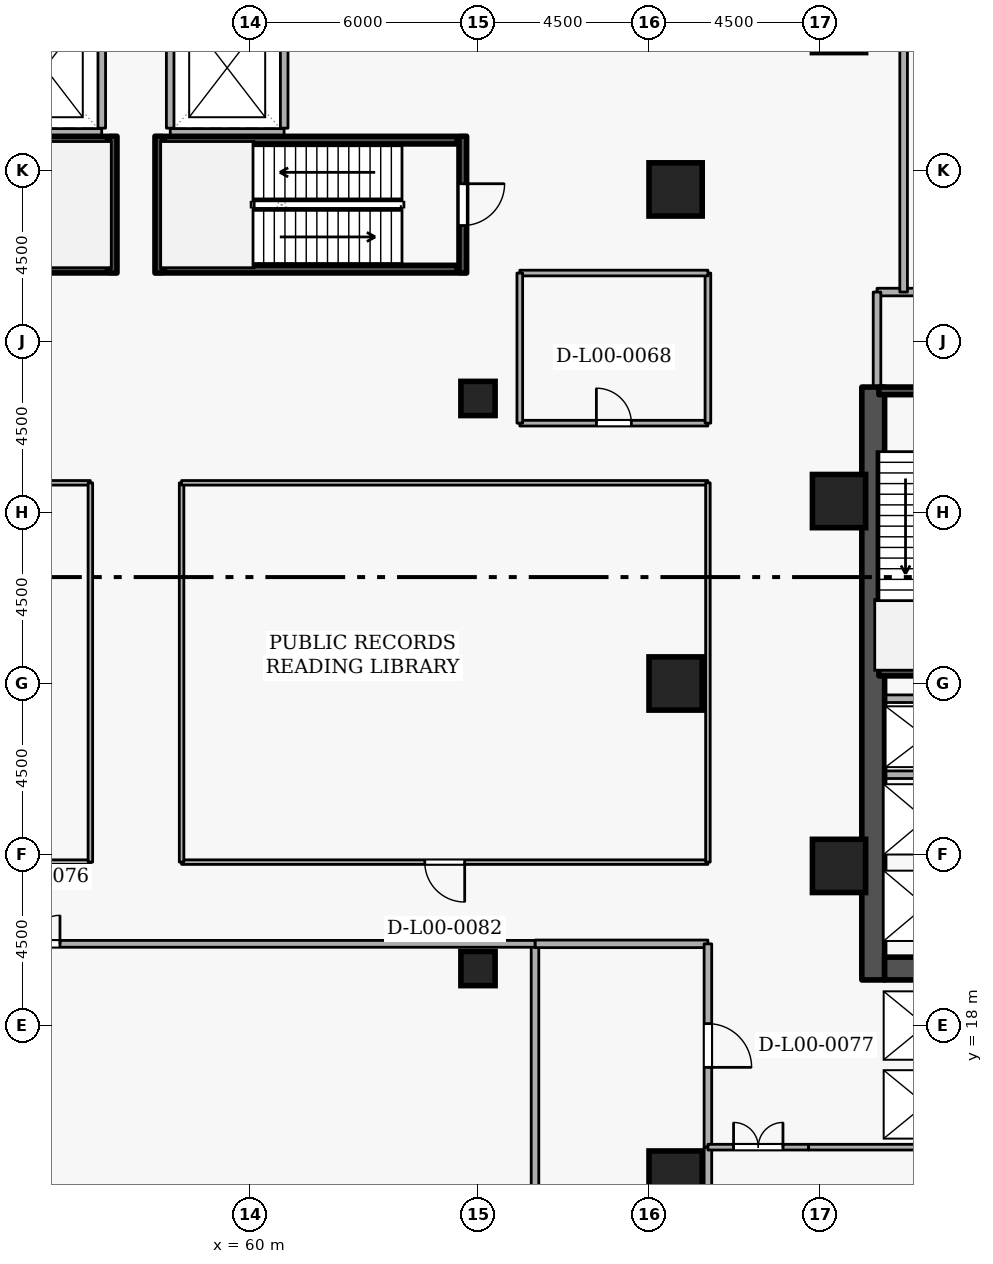
"""IFC4 building model, lengths in metres.
Left out: names, types, materials, properties, quantities, classifications, styles, units other than length and angle.
Written with IfcOpenShell. Run it as: python <this file> out.ifc"""

import sys

from ifc_helpers import new_model, si_unit, direction, frame, frame_2d, origin, origin_2d, place, context, subcontext, project, spatial, rectangle, extrude, element, fill, save


model = new_model("IFC4")
c1 = context("Model", 3, precision=1e-05, world=origin(), true_north=direction((0.0, 1.0)))
c2 = subcontext(c1, "Body", "Model", "MODEL_VIEW")
j1 = project(units=[si_unit("LENGTHUNIT", "METRE"), si_unit("PLANEANGLEUNIT", "RADIAN")], contexts=[c1])
p1 = place(None, origin())
s1 = spatial("IfcSite", under=j1, at=p1, CompositionType="ELEMENT")
p2 = place(p1, origin())
s2 = spatial("IfcBuilding", under=s1, at=p2, CompositionType="ELEMENT")
p3 = place(p2, origin())
s3 = spatial("IfcBuildingStorey", under=s2, at=p3, CompositionType="ELEMENT", Elevation=0.0)
p4 = place(p3, frame((76.4, 19.2, 0.0), z_axis=(0.0, 0.0, 1.0), x_axis=(0.0, 1.0, 0.0)))
e1 = element("IfcWall", 1, at=p4, inside=s3, PredefinedType="SHEAR", context=c2, shape_type="SweptSolid", body=[
    extrude(rectangle(XDim=15.6, YDim=0.6, at=frame_2d((7.8, 0.0))), origin(), (0.0, 0.0, 1.0), 4.8),
])
p5 = place(p3, frame((76.7, 19.5, 0.0), z_axis=(0.0, 0.0, 1.0), x_axis=(1.0, 0.0, 0.0)))
e2 = element("IfcWall", 2, at=p5, inside=s3, PredefinedType="SHEAR", context=c2, shape_type="SweptSolid", body=[
    extrude(rectangle(XDim=5.7, YDim=0.6, at=frame_2d((2.85, 0.0))), origin(), (0.0, 0.0, 1.0), 4.8),
])
for number, where, z_axis, x_axis in (
    (3, (71.2, 14.0, 0.0), (0.0, 0.0, 1.0), (1.0, 0.0, 0.0)),
    (4, (71.2, 27.0, 0.0), (0.0, 0.0, 1.0), (1.0, 0.0, 0.0)),
    (5, (71.2, 40.0, 0.0), (0.0, 0.0, 1.0), (1.0, 0.0, 0.0)),
    (6, (75.5, 22.2, 0.0), (0.0, 0.0, 1.0), (1.0, 0.0, 0.0)),
    (7, (75.5, 31.8, 0.0), (0.0, 0.0, 1.0), (1.0, 0.0, 0.0)),
):
    element("IfcColumn", number, at=place(p3, frame(where, z_axis=z_axis, x_axis=x_axis)), inside=s3, PredefinedType="COLUMN", context=c2, shape_type="SweptSolid", body=[
        extrude(rectangle(XDim=1.4, YDim=1.4, at=origin_2d()), origin(), (0.0, 0.0, 1.0), 4.8),
    ])
for number, where, z_axis, x_axis in (
    (8, (66.0, 19.5, 0.0), (0.0, 0.0, 1.0), (1.0, 0.0, 0.0)),
    (9, (66.0, 34.5, 0.0), (0.0, 0.0, 1.0), (1.0, 0.0, 0.0)),
):
    element("IfcColumn", number, at=place(p3, frame(where, z_axis=z_axis, x_axis=x_axis)), inside=s3, PredefinedType="COLUMN", context=c2, shape_type="SweptSolid", body=[
        extrude(rectangle(XDim=0.9, YDim=0.9, at=origin_2d()), origin(), (0.0, 0.0, 1.0), 4.8),
    ])
for number, where, z_axis, x_axis in (
    (10, (76.712, 26.6, 0.0), (0.0, 0.0, 1.0), (1.0, 0.0, 0.0)),
    (11, (76.712, 24.6, 0.0), (0.0, 0.0, 1.0), (1.0, 0.0, 0.0)),
):
    element("IfcWall", number, at=place(p3, frame(where, z_axis=z_axis, x_axis=x_axis)), inside=s3, PredefinedType="STANDARD", context=c2, shape_type="SweptSolid", body=[
        extrude(rectangle(XDim=2.436, YDim=0.2, at=frame_2d((1.218, 0.0))), origin(), (0.0, 0.0, 1.0), 4.46),
    ])
p6 = place(p3, frame((53.102, 41.5, 0.0), z_axis=(0.0, 0.0, 1.0), x_axis=(1.0, 0.0, 0.0)))
e12 = element("IfcWall", 12, at=p6, inside=s3, PredefinedType="STANDARD", context=c2, shape_type="SweptSolid", body=[
    extrude(rectangle(XDim=2.996, YDim=0.2, at=frame_2d((1.498, 0.0))), origin(), (0.0, 0.0, 1.0), 4.46),
])
p7 = place(p3, frame((56.1, 41.612, 0.0), z_axis=(0.0, 0.0, 1.0), x_axis=(0.0, 1.0, 0.0)))
e13 = element("IfcWall", 13, at=p7, inside=s3, PredefinedType="STANDARD", context=c2, shape_type="SweptSolid", body=[
    extrude(rectangle(XDim=3.286, YDim=0.2, at=frame_2d((1.643, 0.0))), origin(), (0.0, 0.0, 1.0), 4.46),
])
p8 = place(p3, frame((57.902, 41.5, 0.0), z_axis=(0.0, 0.0, 1.0), x_axis=(1.0, 0.0, 0.0)))
e14 = element("IfcWall", 14, at=p8, inside=s3, PredefinedType="STANDARD", context=c2, shape_type="SweptSolid", body=[
    extrude(rectangle(XDim=2.996, YDim=0.2, at=frame_2d((1.498, 0.0))), origin(), (0.0, 0.0, 1.0), 4.46),
])
for number, where, z_axis, x_axis in (
    (15, (60.9, 41.612, 0.0), (0.0, 0.0, 1.0), (0.0, 1.0, 0.0)),
    (16, (57.9, 41.612, 0.0), (0.0, 0.0, 1.0), (0.0, 1.0, 0.0)),
):
    element("IfcWall", number, at=place(p3, frame(where, z_axis=z_axis, x_axis=x_axis)), inside=s3, PredefinedType="STANDARD", context=c2, shape_type="SweptSolid", body=[
        extrude(rectangle(XDim=3.286, YDim=0.2, at=frame_2d((1.643, 0.0))), origin(), (0.0, 0.0, 1.0), 4.46),
    ])
p9 = place(p3, frame((76.55, 34.7, 0.0), z_axis=(0.0, 0.0, 1.0), x_axis=(1.0, 0.0, 0.0)))
e17 = element("IfcWall", 17, at=p9, inside=s3, PredefinedType="SHEAR", context=c2, shape_type="SweptSolid", body=[
    extrude(rectangle(XDim=3.35, YDim=0.2, at=frame_2d((1.675, 0.0))), origin(), (0.0, 0.0, 1.0), 4.8),
])
p10 = place(p9, frame((1.125, 0.0, 0.0)))
e18 = element("IfcOpeningElement", 18, at=p10, cuts=e17, PredefinedType="OPENING", context=c2, shape_type="SweptSolid", body=[
    extrude(rectangle(XDim=1.1, YDim=2.1, at=frame_2d((0.55, 1.05))), frame((0.0, 0.11, 0.0), z_axis=(0.0, -1.0, 0.0), x_axis=(1.0, 0.0, 0.0)), (0.0, 0.0, 1.0), 0.22),
])
p11 = place(p3, frame((79.9, 27.3, 0.0), z_axis=(0.0, 0.0, 1.0), x_axis=(-1.0, 0.0, 0.0)))
e19 = element("IfcWall", 19, at=p11, inside=s3, PredefinedType="SHEAR", context=c2, shape_type="SweptSolid", body=[
    extrude(rectangle(XDim=3.35, YDim=0.2, at=frame_2d((1.675, 0.0))), origin(), (0.0, 0.0, 1.0), 4.8),
])
p12 = place(p3, frame((56.4, 41.4, 0.0), z_axis=(0.0, 0.0, 1.0), x_axis=(0.0, -1.0, 0.0)))
e20 = element("IfcWall", 20, at=p12, inside=s3, PredefinedType="SHEAR", context=c2, shape_type="SweptSolid", body=[
    extrude(rectangle(XDim=3.6, YDim=0.2, at=frame_2d((1.8, 0.0))), origin(), (0.0, 0.0, 1.0), 4.8),
])
for number, where, z_axis, x_axis in (
    (21, (56.25, 41.297, 0.0), (0.0, 0.0, 1.0), (-1.0, 0.0, 0.0)),
    (22, (48.55, 37.903, 0.0), (0.0, 0.0, 1.0), (1.0, 0.0, 0.0)),
):
    element("IfcWall", number, at=place(p3, frame(where, z_axis=z_axis, x_axis=x_axis)), inside=s3, PredefinedType="SHEAR", context=c2, shape_type="SweptSolid", body=[
        extrude(rectangle(XDim=7.7, YDim=0.2, at=frame_2d((3.85, 0.0))), origin(), (0.0, 0.0, 1.0), 4.8),
    ])
p13 = place(p3, frame((65.6, 41.4, 0.0), z_axis=(0.0, 0.0, 1.0), x_axis=(0.0, -1.0, 0.0)))
e23 = element("IfcWall", 23, at=p13, inside=s3, PredefinedType="SHEAR", context=c2, shape_type="SweptSolid", body=[
    extrude(rectangle(XDim=3.6, YDim=0.2, at=frame_2d((1.8, 0.0))), origin(), (0.0, 0.0, 1.0), 4.8),
])
p14 = place(p13, frame((1.25, 0.0, 0.0)))
e24 = element("IfcOpeningElement", 24, at=p14, cuts=e23, PredefinedType="OPENING", context=c2, shape_type="SweptSolid", body=[
    extrude(rectangle(XDim=1.1, YDim=2.1, at=frame_2d((0.55, 1.05))), frame((0.0, 0.11, 0.0), z_axis=(0.0, -1.0, 0.0), x_axis=(1.0, 0.0, 0.0)), (0.0, 0.0, 1.0), 0.22),
])
p15 = place(p3, frame((57.6, 37.8, 0.0), z_axis=(0.0, 0.0, 1.0), x_axis=(0.0, 1.0, 0.0)))
e25 = element("IfcWall", 25, at=p15, inside=s3, PredefinedType="SHEAR", context=c2, shape_type="SweptSolid", body=[
    extrude(rectangle(XDim=3.6, YDim=0.2, at=frame_2d((1.8, 0.0))), origin(), (0.0, 0.0, 1.0), 4.8),
])
for number, where, z_axis, x_axis in (
    (26, (57.75, 37.903, 0.0), (0.0, 0.0, 1.0), (1.0, 0.0, 0.0)),
    (27, (65.45, 41.297, 0.0), (0.0, 0.0, 1.0), (-1.0, 0.0, 0.0)),
):
    element("IfcWall", number, at=place(p3, frame(where, z_axis=z_axis, x_axis=x_axis)), inside=s3, PredefinedType="SHEAR", context=c2, shape_type="SweptSolid", body=[
        extrude(rectangle(XDim=7.7, YDim=0.2, at=frame_2d((3.85, 0.0))), origin(), (0.0, 0.0, 1.0), 4.8),
    ])
p16 = place(p3, frame((81.65, 37.3, 0.0), z_axis=(0.0, 0.0, 1.0), x_axis=(-1.0, 0.0, 0.0)))
e28 = element("IfcWall", 28, at=p16, inside=s3, PredefinedType="STANDARD", context=c2, shape_type="SweptSolid", body=[
    extrude(rectangle(XDim=5.15, YDim=0.2, at=frame_2d((2.575, 0.0))), origin(), (0.0, 0.0, 1.0), 4.46),
])
p17 = place(p16, frame((2.75, 0.0, 0.0)))
e29 = element("IfcOpeningElement", 29, at=p17, cuts=e28, PredefinedType="OPENING", context=c2, shape_type="SweptSolid", body=[
    extrude(rectangle(XDim=1.15, YDim=2.1, at=frame_2d((0.575, 1.05))), frame((0.0, 0.11, 0.0), z_axis=(0.0, -1.0, 0.0), x_axis=(1.0, 0.0, 0.0)), (0.0, 0.0, 1.0), 0.22),
])
p18 = place(p3, frame((76.5, 37.3, 0.0), z_axis=(0.0, 0.0, 1.0), x_axis=(0.0, -1.0, 0.0)))
e30 = element("IfcWall", 30, at=p18, inside=s3, PredefinedType="STANDARD", context=c2, shape_type="SweptSolid", body=[
    extrude(rectangle(XDim=2.5, YDim=0.2, at=frame_2d((1.25, 0.0))), origin(), (0.0, 0.0, 1.0), 4.46),
])
p19 = place(p3, frame((77.2, 37.3, 0.0), z_axis=(0.0, 0.0, 1.0), x_axis=(0.0, 1.0, 0.0)))
e31 = element("IfcWall", 31, at=p19, inside=s3, PredefinedType="STANDARD", context=c2, shape_type="SweptSolid", body=[
    extrude(rectangle(XDim=11.88, YDim=0.2, at=frame_2d((5.94, 0.0))), origin(), (0.0, 0.0, 1.0), 4.46),
])
p20 = place(p3, frame((67.5, 4.82, 0.0), z_axis=(0.0, 0.0, 1.0), x_axis=(0.0, 1.0, 0.0)))
e32 = element("IfcWall", 32, at=p20, inside=s3, PredefinedType="STANDARD", context=c2, shape_type="SweptSolid", body=[
    extrude(rectangle(XDim=15.33, YDim=0.2, at=frame_2d((7.665, 0.0))), origin(), (0.0, 0.0, 1.0), 3.538),
])
p21 = place(p3, frame((67.5, 20.15, 0.0), z_axis=(0.0, 0.0, 1.0), x_axis=(1.0, 0.0, 0.0)))
e33 = element("IfcWall", 33, at=p21, inside=s3, PredefinedType="STANDARD", context=c2, shape_type="SweptSolid", body=[
    extrude(rectangle(XDim=4.55, YDim=0.2, at=frame_2d((2.275, 0.0))), origin(), (0.0, 0.0, 1.0), 4.46),
])
p22 = place(p3, frame((72.05, 20.15, 0.0), z_axis=(0.0, 0.0, 1.0), x_axis=(0.0, -1.0, 0.0)))
e34 = element("IfcWall", 34, at=p22, inside=s3, PredefinedType="STANDARD", context=c2, shape_type="SweptSolid", body=[
    extrude(rectangle(XDim=5.35, YDim=0.2, at=frame_2d((2.675, 0.0))), origin(), (0.0, 0.0, 1.0), 4.46),
])
p23 = place(p22, frame((2.1, 0.0, 0.0)))
e35 = element("IfcOpeningElement", 35, at=p23, cuts=e34, PredefinedType="OPENING", context=c2, shape_type="SweptSolid", body=[
    extrude(rectangle(XDim=1.15, YDim=2.1, at=frame_2d((0.575, 1.05))), frame((0.0, 0.11, 0.0), z_axis=(0.0, -1.0, 0.0), x_axis=(1.0, 0.0, 0.0)), (0.0, 0.0, 1.0), 0.22),
])
p24 = place(p3, frame((72.05, 14.8, 0.0), z_axis=(0.0, 0.0, 1.0), x_axis=(0.0, -1.0, 0.0)))
e36 = element("IfcWall", 36, at=p24, inside=s3, PredefinedType="STANDARD", context=c2, shape_type="SweptSolid", body=[
    extrude(rectangle(XDim=9.98, YDim=0.2, at=frame_2d((4.99, 0.0))), origin(), (0.0, 0.0, 1.0), 4.46),
])
p25 = place(p3, frame((67.1, 33.85, 0.0), z_axis=(0.0, 0.0, 1.0), x_axis=(1.0, 0.0, 0.0)))
e37 = element("IfcWall", 37, at=p25, inside=s3, PredefinedType="PARTITIONING", context=c2, shape_type="SweptSolid", body=[
    extrude(rectangle(XDim=4.95, YDim=0.15, at=frame_2d((2.475, 0.0))), origin(), (0.0, 0.0, 1.0), 4.46),
])
p26 = place(p25, frame((2.015, 0.0, 0.0)))
e38 = element("IfcOpeningElement", 38, at=p26, cuts=e37, PredefinedType="OPENING", context=c2, shape_type="SweptSolid", body=[
    extrude(rectangle(XDim=0.92, YDim=2.08, at=frame_2d((0.46, 1.04))), frame((0.0, 0.085, 0.0), z_axis=(0.0, -1.0, 0.0), x_axis=(1.0, 0.0, 0.0)), (0.0, 0.0, 1.0), 0.17),
])
p27 = place(p3, frame((72.05, 33.85, 0.0), z_axis=(0.0, 0.0, 1.0), x_axis=(0.0, 1.0, 0.0)))
e39 = element("IfcWall", 39, at=p27, inside=s3, PredefinedType="PARTITIONING", context=c2, shape_type="SweptSolid", body=[
    extrude(rectangle(XDim=3.95, YDim=0.15, at=frame_2d((1.975, 0.0))), origin(), (0.0, 0.0, 1.0), 4.46),
])
p28 = place(p3, frame((72.05, 37.8, 0.0), z_axis=(0.0, 0.0, 1.0), x_axis=(-1.0, 0.0, 0.0)))
e40 = element("IfcWall", 40, at=p28, inside=s3, PredefinedType="PARTITIONING", context=c2, shape_type="SweptSolid", body=[
    extrude(rectangle(XDim=4.95, YDim=0.15, at=frame_2d((2.475, 0.0))), origin(), (0.0, 0.0, 1.0), 4.46),
])
p29 = place(p3, frame((67.1, 37.8, 0.0), z_axis=(0.0, 0.0, 1.0), x_axis=(0.0, -1.0, 0.0)))
e41 = element("IfcWall", 41, at=p29, inside=s3, PredefinedType="PARTITIONING", context=c2, shape_type="SweptSolid", body=[
    extrude(rectangle(XDim=3.95, YDim=0.15, at=frame_2d((1.975, 0.0))), origin(), (0.0, 0.0, 1.0), 4.46),
])
p30 = place(p3, frame((41.0, 20.15, 0.0), z_axis=(0.0, 0.0, 1.0), x_axis=(1.0, 0.0, 0.0)))
e42 = element("IfcWall", 42, at=p30, inside=s3, PredefinedType="PARTITIONING", context=c2, shape_type="SweptSolid", body=[
    extrude(rectangle(XDim=26.5, YDim=0.18, at=frame_2d((13.25, 0.0))), origin(), (0.0, 0.0, 1.0), 4.46),
])
p31 = place(p30, frame((12.5, 0.0, 0.0)))
e43 = element("IfcOpeningElement", 43, at=p31, cuts=e42, PredefinedType="OPENING", context=c2, shape_type="SweptSolid", body=[
    extrude(rectangle(XDim=1.5, YDim=2.15, at=frame_2d((0.75, 1.075))), frame((0.0, 0.1, 0.0), z_axis=(0.0, -1.0, 0.0), x_axis=(1.0, 0.0, 0.0)), (0.0, 0.0, 1.0), 0.2),
])
p32 = place(p3, frame((72.05, 14.8, 0.0), z_axis=(0.0, 0.0, 1.0), x_axis=(1.0, 0.0, 0.0)))
e44 = element("IfcWall", 44, at=p32, inside=s3, PredefinedType="PARTITIONING", context=c2, shape_type="SweptSolid", body=[
    extrude(rectangle(XDim=2.65, YDim=0.15, at=frame_2d((1.325, 0.0))), origin(), (0.0, 0.0, 1.0), 4.46),
])
p33 = place(p32, frame((0.675, 0.0, 0.0)))
e45 = element("IfcOpeningElement", 45, at=p33, cuts=e44, PredefinedType="OPENING", context=c2, shape_type="SweptSolid", body=[
    extrude(rectangle(XDim=1.3, YDim=2.12, at=frame_2d((0.65, 1.06))), frame((0.0, 0.085, 0.0), z_axis=(0.0, -1.0, 0.0), x_axis=(1.0, 0.0, 0.0)), (0.0, 0.0, 1.0), 0.17),
])
p34 = place(p3, frame((74.7, 14.8, 0.0), z_axis=(0.0, 0.0, 1.0), x_axis=(1.0, 0.0, 0.0)))
e46 = element("IfcWall", 46, at=p34, inside=s3, PredefinedType="PARTITIONING", context=c2, shape_type="SweptSolid", body=[
    extrude(rectangle(XDim=4.65, YDim=0.15, at=frame_2d((2.325, 0.0))), origin(), (0.0, 0.0, 1.0), 4.46),
])
p35 = place(p3, frame((55.8, 22.3, 0.0), z_axis=(0.0, 0.0, 1.0), x_axis=(-1.0, 0.0, 0.0)))
e47 = element("IfcWall", 47, at=p35, inside=s3, PredefinedType="PARTITIONING", context=c2, shape_type="SweptSolid", body=[
    extrude(rectangle(XDim=17.8, YDim=0.12, at=frame_2d((8.9, 0.0))), origin(), (0.0, 0.0, 1.0), 4.46),
])
p36 = place(p35, frame((8.375, 0.0, 0.0)))
e48 = element("IfcOpeningElement", 48, at=p36, cuts=e47, PredefinedType="OPENING", context=c2, shape_type="SweptSolid", body=[
    extrude(rectangle(XDim=1.05, YDim=2.1, at=frame_2d((0.525, 1.05))), frame((0.0, 0.07, 0.0), z_axis=(0.0, -1.0, 0.0), x_axis=(1.0, 0.0, 0.0)), (0.0, 0.0, 1.0), 0.14),
])
p37 = place(p3, frame((38.0, 32.28, 0.0), z_axis=(0.0, 0.0, 1.0), x_axis=(1.0, 0.0, 0.0)))
e49 = element("IfcWall", 49, at=p37, inside=s3, PredefinedType="PARTITIONING", context=c2, shape_type="SweptSolid", body=[
    extrude(rectangle(XDim=17.8, YDim=0.12, at=frame_2d((8.9, 0.0))), origin(), (0.0, 0.0, 1.0), 4.46),
])
p38 = place(p3, frame((55.8, 32.28, 0.0), z_axis=(0.0, 0.0, 1.0), x_axis=(0.0, -1.0, 0.0)))
e50 = element("IfcWall", 50, at=p38, inside=s3, PredefinedType="PARTITIONING", context=c2, shape_type="SweptSolid", body=[
    extrude(rectangle(XDim=9.98, YDim=0.12, at=frame_2d((4.99, 0.0))), origin(), (0.0, 0.0, 1.0), 4.46),
])
p39 = place(p3, frame((72.05, 22.3, 0.0), z_axis=(0.0, 0.0, 1.0), x_axis=(-1.0, 0.0, 0.0)))
e51 = element("IfcWall", 51, at=p39, inside=s3, PredefinedType="PARTITIONING", context=c2, shape_type="SweptSolid", body=[
    extrude(rectangle(XDim=13.85, YDim=0.12, at=frame_2d((6.925, 0.0))), origin(), (0.0, 0.0, 1.0), 4.46),
])
p40 = place(p39, frame((6.4, 0.0, 0.0)))
e52 = element("IfcOpeningElement", 52, at=p40, cuts=e51, PredefinedType="OPENING", context=c2, shape_type="SweptSolid", body=[
    extrude(rectangle(XDim=1.05, YDim=2.1, at=frame_2d((0.525, 1.05))), frame((0.0, 0.07, 0.0), z_axis=(0.0, -1.0, 0.0), x_axis=(1.0, 0.0, 0.0)), (0.0, 0.0, 1.0), 0.14),
])
p41 = place(p3, frame((58.2, 22.3, 0.0), z_axis=(0.0, 0.0, 1.0), x_axis=(0.0, 1.0, 0.0)))
e53 = element("IfcWall", 53, at=p41, inside=s3, PredefinedType="PARTITIONING", context=c2, shape_type="SweptSolid", body=[
    extrude(rectangle(XDim=9.98, YDim=0.12, at=frame_2d((4.99, 0.0))), origin(), (0.0, 0.0, 1.0), 4.46),
])
p42 = place(p3, frame((58.2, 32.28, 0.0), z_axis=(0.0, 0.0, 1.0), x_axis=(1.0, 0.0, 0.0)))
e54 = element("IfcWall", 54, at=p42, inside=s3, PredefinedType="PARTITIONING", context=c2, shape_type="SweptSolid", body=[
    extrude(rectangle(XDim=13.85, YDim=0.12, at=frame_2d((6.925, 0.0))), origin(), (0.0, 0.0, 1.0), 4.46),
])
p43 = place(p3, frame((72.05, 32.28, 0.0), z_axis=(0.0, 0.0, 1.0), x_axis=(0.0, -1.0, 0.0)))
e55 = element("IfcWall", 55, at=p43, inside=s3, PredefinedType="PARTITIONING", context=c2, shape_type="SweptSolid", body=[
    extrude(rectangle(XDim=9.98, YDim=0.12, at=frame_2d((4.99, 0.0))), origin(), (0.0, 0.0, 1.0), 4.46),
])
p44 = place(p14, origin())
e56 = element("IfcDoor", 56, at=p44, inside=s3, OperationType="SINGLE_SWING_LEFT", PredefinedType="DOOR", context=c2, shape_type="SweptSolid", body=[
    extrude(rectangle(XDim=1.1, YDim=2.1, at=frame_2d((0.55, 1.05))), frame((0.0, 0.025, 0.0), z_axis=(0.0, -1.0, 0.0), x_axis=(1.0, 0.0, 0.0)), (0.0, 0.0, 1.0), 0.05),
])
fill(e24, e56)
p45 = place(p26, origin())
e57 = element("IfcDoor", 57, at=p45, inside=s3, OperationType="SINGLE_SWING_LEFT", PredefinedType="DOOR", context=c2, shape_type="SweptSolid", body=[
    extrude(rectangle(XDim=0.92, YDim=2.08, at=frame_2d((0.46, 1.04))), frame((0.0, 0.025, 0.0), z_axis=(0.0, -1.0, 0.0), x_axis=(1.0, 0.0, 0.0)), (0.0, 0.0, 1.0), 0.05),
])
fill(e38, e57)
p46 = place(p31, origin())
e58 = element("IfcDoor", 58, at=p46, inside=s3, OperationType="DOUBLE_DOOR_SINGLE_SWING", PredefinedType="DOOR", context=c2, shape_type="SweptSolid", body=[
    extrude(rectangle(XDim=1.5, YDim=2.15, at=frame_2d((0.75, 1.075))), frame((0.0, 0.025, 0.0), z_axis=(0.0, -1.0, 0.0), x_axis=(1.0, 0.0, 0.0)), (0.0, 0.0, 1.0), 0.05),
])
fill(e43, e58)
p47 = place(p23, origin())
e59 = element("IfcDoor", 59, at=p47, inside=s3, OperationType="SINGLE_SWING_RIGHT", PredefinedType="DOOR", context=c2, shape_type="SweptSolid", body=[
    extrude(rectangle(XDim=1.15, YDim=2.1, at=frame_2d((0.575, 1.05))), frame((0.0, 0.025, 0.0), z_axis=(0.0, -1.0, 0.0), x_axis=(1.0, 0.0, 0.0)), (0.0, 0.0, 1.0), 0.05),
])
fill(e35, e59)
p48 = place(p33, origin())
e60 = element("IfcDoor", 60, at=p48, inside=s3, OperationType="DOUBLE_DOOR_SINGLE_SWING", PredefinedType="DOOR", context=c2, shape_type="SweptSolid", body=[
    extrude(rectangle(XDim=1.3, YDim=2.12, at=frame_2d((0.65, 1.06))), frame((0.0, 0.025, 0.0), z_axis=(0.0, -1.0, 0.0), x_axis=(1.0, 0.0, 0.0)), (0.0, 0.0, 1.0), 0.05),
])
fill(e45, e60)
p49 = place(p40, origin())
e61 = element("IfcDoor", 61, at=p49, inside=s3, OperationType="SINGLE_SWING_LEFT", PredefinedType="DOOR", context=c2, shape_type="SweptSolid", body=[
    extrude(rectangle(XDim=1.05, YDim=2.1, at=frame_2d((0.525, 1.05))), frame((0.0, 0.025, 0.0), z_axis=(0.0, -1.0, 0.0), x_axis=(1.0, 0.0, 0.0)), (0.0, 0.0, 1.0), 0.05),
])
fill(e52, e61)
save(model, sys.argv[1])
